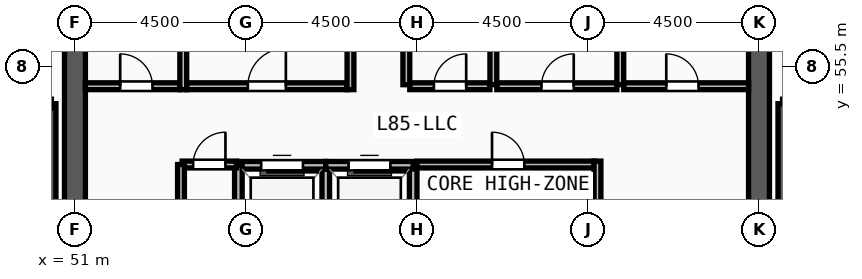
"""IFC4 building model, lengths in metres.
Left out: names, types, materials, properties, quantities, classifications, styles, units other than length and angle.
Written with IfcOpenShell. Run it as: python <this file> out.ifc"""

import sys

from ifc_helpers import new_model, si_unit, direction, frame, frame_2d, origin, place, context, subcontext, project, spatial, rectangle, extrude, source, transform, mapped, element, fill, save


model = new_model("IFC4")
c1 = context("Model", 3, precision=1e-05, world=origin(), true_north=direction((0.0, 1.0)))
c2 = subcontext(c1, "Body", "Model", "MODEL_VIEW")
j1 = project(units=[si_unit("LENGTHUNIT", "METRE"), si_unit("PLANEANGLEUNIT", "RADIAN")], contexts=[c1])
p1 = place(None, origin())
s1 = spatial("IfcSite", under=j1, at=p1, CompositionType="ELEMENT")
p2 = place(p1, origin())
s2 = spatial("IfcBuilding", under=s1, at=p2, CompositionType="ELEMENT")
p3 = place(p2, frame((0.0, 0.0, 328.5)))
s3 = spatial("IfcBuildingStorey", under=s2, at=p3, CompositionType="ELEMENT", Elevation=328.5)
p4 = place(p3, frame((69.0, 60.9, 0.0), z_axis=(0.0, 0.0, 1.0), x_axis=(0.0, -1.0, 0.0)))
e1 = element("IfcWall", 1, at=p4, inside=s3, PredefinedType="SHEAR", context=c2, shape_type="SweptSolid", body=[
    extrude(rectangle(XDim=13.8, YDim=0.55, at=frame_2d((6.9, 0.0))), origin(), (0.0, 0.0, 1.0), 3.57),
])
m1 = source(origin(), c2, "Body", "SweptSolid", [
    extrude(rectangle(XDim=1.2, YDim=2.2, at=frame_2d((0.6, 1.1))), frame((0.0, 0.285, 0.0), z_axis=(0.0, -1.0, 0.0), x_axis=(1.0, 0.0, 0.0)), (0.0, 0.0, 1.0), 0.57),
])
p5 = place(p4, frame((1.35, 0.0, 0.0)))
e2 = element("IfcOpeningElement", 2, at=p5, cuts=e1, PredefinedType="OPENING", context=c2, shape_type="MappedRepresentation", body=[
    mapped(m1, transform((0.0, 0.0, 0.0), x_axis=(1.0, 0.0, 0.0), y_axis=(0.0, 1.0, 0.0), z_axis=(0.0, 0.0, 1.0), scale=1.0)),
])
p6 = place(p3, frame((51.0, 47.1, 0.0), z_axis=(0.0, 0.0, 1.0), x_axis=(0.0, 1.0, 0.0)))
e3 = element("IfcWall", 3, at=p6, inside=s3, PredefinedType="SHEAR", context=c2, shape_type="SweptSolid", body=[
    extrude(rectangle(XDim=13.8, YDim=0.55, at=frame_2d((6.9, 0.0))), origin(), (0.0, 0.0, 1.0), 3.57),
])
for number, where, z_axis, x_axis in (
    (4, (50.38, 46.7, 0.0), (0.0, 0.0, 1.0), (0.0, 1.0, 0.0)),
    (5, (69.62, 54.52, 0.0), (0.0, 0.0, 1.0), (0.0, -1.0, 0.0)),
):
    element("IfcWall", number, at=place(p3, frame(where, z_axis=z_axis, x_axis=x_axis)), inside=s3, PredefinedType="SOLIDWALL", context=c2, shape_type="SweptSolid", body=[
        extrude(rectangle(XDim=7.82, YDim=0.24, at=frame_2d((3.91, 0.0))), origin(), (0.0, 0.0, 1.0), 3.57),
    ])
p7 = place(p3, frame((57.6, 50.3, 0.0), z_axis=(0.0, 0.0, 1.0), x_axis=(0.0, 1.0, 0.0)))
e6 = element("IfcWall", 6, at=p7, inside=s3, PredefinedType="SOLIDWALL", context=c2, shape_type="SweptSolid", body=[
    extrude(rectangle(XDim=2.6, YDim=0.2, at=frame_2d((1.3, 0.0))), origin(), (0.0, 0.0, 1.0), 3.57),
])
p8 = place(p3, frame((57.6, 52.9, 0.0), z_axis=(0.0, 0.0, 1.0), x_axis=(-1.0, 0.0, 0.0)))
e7 = element("IfcWall", 7, at=p8, inside=s3, PredefinedType="SOLIDWALL", context=c2, shape_type="SweptSolid", body=[
    extrude(rectangle(XDim=2.3, YDim=0.2, at=frame_2d((1.15, 0.0))), origin(), (0.0, 0.0, 1.0), 3.57),
])
m2 = source(origin(), c2, "Body", "SweptSolid", [
    extrude(rectangle(XDim=1.1, YDim=2.2, at=frame_2d((0.55, 1.1))), frame((0.0, 0.11, 0.0), z_axis=(0.0, -1.0, 0.0), x_axis=(1.0, 0.0, 0.0)), (0.0, 0.0, 1.0), 0.22),
])
p9 = place(p8, frame((0.6, 0.0, 0.0)))
e8 = element("IfcOpeningElement", 8, at=p9, cuts=e7, PredefinedType="OPENING", context=c2, shape_type="MappedRepresentation", body=[
    mapped(m2, transform((0.0, 0.0, 0.0), x_axis=(1.0, 0.0, 0.0), y_axis=(0.0, 1.0, 0.0), z_axis=(0.0, 0.0, 1.0), scale=1.0)),
])
for number, where, z_axis, x_axis in (
    (9, (55.3, 52.9, 0.0), (0.0, 0.0, 1.0), (0.0, -1.0, 0.0)),
    (10, (59.9, 50.3, 0.0), (0.0, 0.0, 1.0), (0.0, 1.0, 0.0)),
):
    element("IfcWall", number, at=place(p3, frame(where, z_axis=z_axis, x_axis=x_axis)), inside=s3, PredefinedType="SOLIDWALL", context=c2, shape_type="SweptSolid", body=[
        extrude(rectangle(XDim=2.6, YDim=0.2, at=frame_2d((1.3, 0.0))), origin(), (0.0, 0.0, 1.0), 3.57),
    ])
p10 = place(p3, frame((59.9, 52.9, 0.0), z_axis=(0.0, 0.0, 1.0), x_axis=(-1.0, 0.0, 0.0)))
e11 = element("IfcWall", 11, at=p10, inside=s3, PredefinedType="SOLIDWALL", context=c2, shape_type="SweptSolid", body=[
    extrude(rectangle(XDim=2.3, YDim=0.2, at=frame_2d((1.15, 0.0))), origin(), (0.0, 0.0, 1.0), 3.57),
])
p11 = place(p10, frame((0.6, 0.0, 0.0)))
e12 = element("IfcOpeningElement", 12, at=p11, cuts=e11, PredefinedType="OPENING", context=c2, shape_type="MappedRepresentation", body=[
    mapped(m2, transform((0.0, 0.0, 0.0), x_axis=(1.0, 0.0, 0.0), y_axis=(0.0, 1.0, 0.0), z_axis=(0.0, 0.0, 1.0), scale=1.0)),
])
p12 = place(p3, frame((60.0, 52.92, 0.0), z_axis=(0.0, 0.0, 1.0), x_axis=(1.0, 0.0, 0.0)))
e13 = element("IfcWall", 13, at=p12, inside=s3, PredefinedType="PARTITIONING", context=c2, shape_type="SweptSolid", body=[
    extrude(rectangle(XDim=4.66, YDim=0.18, at=frame_2d((2.33, 0.0))), origin(), (0.0, 0.0, 1.0), 3.57),
])
m3 = source(origin(), c2, "Body", "SweptSolid", [
    extrude(rectangle(XDim=0.85, YDim=2.1, at=frame_2d((0.425, 1.05))), frame((0.0, 0.1, 0.0), z_axis=(0.0, -1.0, 0.0), x_axis=(1.0, 0.0, 0.0)), (0.0, 0.0, 1.0), 0.2),
])
p13 = place(p12, frame((1.975, 0.0, 0.0)))
e14 = element("IfcOpeningElement", 14, at=p13, cuts=e13, PredefinedType="OPENING", context=c2, shape_type="MappedRepresentation", body=[
    mapped(m3, transform((0.0, 0.0, 0.0), x_axis=(1.0, 0.0, 0.0), y_axis=(0.0, 1.0, 0.0), z_axis=(0.0, 0.0, 1.0), scale=1.0)),
])
p14 = place(p3, frame((53.94, 54.98, 0.0), z_axis=(0.0, 0.0, 1.0), x_axis=(1.0, 0.0, 0.0)))
e15 = element("IfcWall", 15, at=p14, inside=s3, PredefinedType="PARTITIONING", context=c2, shape_type="SweptSolid", body=[
    extrude(rectangle(XDim=4.22, YDim=0.18, at=frame_2d((2.11, 0.0))), origin(), (0.0, 0.0, 1.0), 3.57),
])
m4 = source(origin(), c2, "Body", "SweptSolid", [
    extrude(rectangle(XDim=1.0, YDim=2.2, at=frame_2d((0.5, 1.1))), frame((0.0, 0.1, 0.0), z_axis=(0.0, -1.0, 0.0), x_axis=(1.0, 0.0, 0.0)), (0.0, 0.0, 1.0), 0.2),
])
p15 = place(p14, frame((1.61, 0.0, 0.0)))
e16 = element("IfcOpeningElement", 16, at=p15, cuts=e15, PredefinedType="OPENING", context=c2, shape_type="MappedRepresentation", body=[
    mapped(m4, transform((0.0, 0.0, 0.0), x_axis=(1.0, 0.0, 0.0), y_axis=(0.0, 1.0, 0.0), z_axis=(0.0, 0.0, 1.0), scale=1.0)),
])
p16 = place(p3, frame((51.275, 54.98, 0.0), z_axis=(0.0, 0.0, 1.0), x_axis=(1.0, 0.0, 0.0)))
e17 = element("IfcWall", 17, at=p16, inside=s3, PredefinedType="PARTITIONING", context=c2, shape_type="SweptSolid", body=[
    extrude(rectangle(XDim=2.485, YDim=0.18, at=frame_2d((1.243, 0.0))), origin(), (0.0, 0.0, 1.0), 3.57),
])
p17 = place(p16, frame((0.915, 0.0, 0.0)))
e18 = element("IfcOpeningElement", 18, at=p17, cuts=e17, PredefinedType="OPENING", context=c2, shape_type="MappedRepresentation", body=[
    mapped(m3, transform((0.0, 0.0, 0.0), x_axis=(1.0, 0.0, 0.0), y_axis=(0.0, 1.0, 0.0), z_axis=(0.0, 0.0, 1.0), scale=1.0)),
])
p18 = place(p3, frame((62.1, 54.98, 0.0), z_axis=(0.0, 0.0, 1.0), x_axis=(1.0, 0.0, 0.0)))
e19 = element("IfcWall", 19, at=p18, inside=s3, PredefinedType="PARTITIONING", context=c2, shape_type="SweptSolid", body=[
    extrude(rectangle(XDim=3.16, YDim=0.18, at=frame_2d((1.58, 0.0))), origin(), (0.0, 0.0, 1.0), 3.57),
])
p19 = place(p18, frame((1.175, 0.0, 0.0)))
e20 = element("IfcOpeningElement", 20, at=p19, cuts=e19, PredefinedType="OPENING", context=c2, shape_type="MappedRepresentation", body=[
    mapped(m3, transform((0.0, 0.0, 0.0), x_axis=(1.0, 0.0, 0.0), y_axis=(0.0, 1.0, 0.0), z_axis=(0.0, 0.0, 1.0), scale=1.0)),
])
p20 = place(p3, frame((65.44, 54.98, 0.0), z_axis=(0.0, 0.0, 1.0), x_axis=(1.0, 0.0, 0.0)))
e21 = element("IfcWall", 21, at=p20, inside=s3, PredefinedType="PARTITIONING", context=c2, shape_type="SweptSolid", body=[
    extrude(rectangle(XDim=3.285, YDim=0.18, at=frame_2d((1.643, 0.0))), origin(), (0.0, 0.0, 1.0), 3.57),
])
p21 = place(p20, frame((1.12, 0.0, 0.0)))
e22 = element("IfcOpeningElement", 22, at=p21, cuts=e21, PredefinedType="OPENING", context=c2, shape_type="MappedRepresentation", body=[
    mapped(m3, transform((0.0, 0.0, 0.0), x_axis=(1.0, 0.0, 0.0), y_axis=(0.0, 1.0, 0.0), z_axis=(0.0, 0.0, 1.0), scale=1.0)),
])
p22 = place(p3, frame((59.81, 54.98, 0.0), z_axis=(0.0, 0.0, 1.0), x_axis=(1.0, 0.0, 0.0)))
e23 = element("IfcWall", 23, at=p22, inside=s3, PredefinedType="PARTITIONING", context=c2, shape_type="SweptSolid", body=[
    extrude(rectangle(XDim=2.11, YDim=0.18, at=frame_2d((1.055, 0.0))), origin(), (0.0, 0.0, 1.0), 3.57),
])
p23 = place(p22, frame((0.635, 0.0, 0.0)))
e24 = element("IfcOpeningElement", 24, at=p23, cuts=e23, PredefinedType="OPENING", context=c2, shape_type="MappedRepresentation", body=[
    mapped(m3, transform((0.0, 0.0, 0.0), x_axis=(1.0, 0.0, 0.0), y_axis=(0.0, 1.0, 0.0), z_axis=(0.0, 0.0, 1.0), scale=1.0)),
])
p24 = place(p3, frame((53.82, 52.92, 0.0), z_axis=(0.0, 0.0, 1.0), x_axis=(1.0, 0.0, 0.0)))
e25 = element("IfcWall", 25, at=p24, inside=s3, PredefinedType="PARTITIONING", context=c2, shape_type="SweptSolid", body=[
    extrude(rectangle(XDim=1.43, YDim=0.18, at=frame_2d((0.715, 0.0))), origin(), (0.0, 0.0, 1.0), 3.57),
])
p25 = place(p24, frame((0.29, 0.0, 0.0)))
e26 = element("IfcOpeningElement", 26, at=p25, cuts=e25, PredefinedType="OPENING", context=c2, shape_type="MappedRepresentation", body=[
    mapped(m3, transform((0.0, 0.0, 0.0), x_axis=(1.0, 0.0, 0.0), y_axis=(0.0, 1.0, 0.0), z_axis=(0.0, 0.0, 1.0), scale=1.0)),
])
p26 = place(p3, frame((65.35, 55.02, 0.0), z_axis=(0.0, 0.0, 1.0), x_axis=(0.0, 1.0, 0.0)))
e27 = element("IfcWall", 27, at=p26, inside=s3, PredefinedType="PARTITIONING", context=c2, shape_type="SweptSolid", body=[
    extrude(rectangle(XDim=2.86, YDim=0.18, at=frame_2d((1.43, 0.0))), origin(), (0.0, 0.0, 1.0), 3.57),
])
for number, where, z_axis, x_axis in (
    (28, (59.72, 55.02, 0.0), (0.0, 0.0, 1.0), (0.0, 1.0, 0.0)),
    (29, (62.01, 55.02, 0.0), (0.0, 0.0, 1.0), (0.0, 1.0, 0.0)),
):
    element("IfcWall", number, at=place(p3, frame(where, z_axis=z_axis, x_axis=x_axis)), inside=s3, PredefinedType="PARTITIONING", context=c2, shape_type="SweptSolid", body=[
        extrude(rectangle(XDim=2.88, YDim=0.18, at=frame_2d((1.44, 0.0))), origin(), (0.0, 0.0, 1.0), 3.57),
    ])
p27 = place(p3, frame((53.79, 50.35, 0.0), z_axis=(0.0, 0.0, 1.0), x_axis=(0.0, 1.0, 0.0)))
e30 = element("IfcWall", 30, at=p27, inside=s3, PredefinedType="PARTITIONING", context=c2, shape_type="SweptSolid", body=[
    extrude(rectangle(XDim=2.57, YDim=0.18, at=frame_2d((1.285, 0.0))), origin(), (0.0, 0.0, 1.0), 3.57),
])
p28 = place(p3, frame((64.75, 50.36, 0.0), z_axis=(0.0, 0.0, 1.0), x_axis=(0.0, 1.0, 0.0)))
e31 = element("IfcWall", 31, at=p28, inside=s3, PredefinedType="PARTITIONING", context=c2, shape_type="SweptSolid", body=[
    extrude(rectangle(XDim=2.65, YDim=0.18, at=frame_2d((1.325, 0.0))), origin(), (0.0, 0.0, 1.0), 3.57),
])
for number, where, z_axis, x_axis in (
    (32, (53.85, 54.89, 0.0), (0.0, 0.0, 1.0), (0.0, 1.0, 0.0)),
    (33, (58.25, 54.89, 0.0), (0.0, 0.0, 1.0), (0.0, 1.0, 0.0)),
):
    element("IfcWall", number, at=place(p3, frame(where, z_axis=z_axis, x_axis=x_axis)), inside=s3, PredefinedType="PARTITIONING", context=c2, shape_type="SweptSolid", body=[
        extrude(rectangle(XDim=3.02, YDim=0.18, at=frame_2d((1.51, 0.0))), origin(), (0.0, 0.0, 1.0), 3.57),
    ])
m5 = source(origin(), c2, "Body", "SweptSolid", [
    extrude(rectangle(XDim=1.1, YDim=2.2, at=frame_2d((0.55, 1.1))), frame((0.0, 0.025, 0.0), z_axis=(0.0, -1.0, 0.0), x_axis=(1.0, 0.0, 0.0)), (0.0, 0.0, 1.0), 0.05),
])
p29 = place(p9, origin())
e34 = element("IfcDoor", 34, at=p29, inside=s3, OperationType="SLIDING_TO_LEFT", PredefinedType="DOOR", context=c2, shape_type="MappedRepresentation", body=[
    mapped(m5, transform((0.0, 0.0, 0.0), x_axis=(1.0, 0.0, 0.0), y_axis=(0.0, 1.0, 0.0), z_axis=(0.0, 0.0, 1.0), scale=1.0)),
])
fill(e8, e34)
p30 = place(p11, origin())
e35 = element("IfcDoor", 35, at=p30, inside=s3, OperationType="SLIDING_TO_LEFT", PredefinedType="DOOR", context=c2, shape_type="MappedRepresentation", body=[
    mapped(m5, transform((0.0, 0.0, 0.0), x_axis=(1.0, 0.0, 0.0), y_axis=(0.0, 1.0, 0.0), z_axis=(0.0, 0.0, 1.0), scale=1.0)),
])
fill(e12, e35)
m6 = source(origin(), c2, "Body", "SweptSolid", [
    extrude(rectangle(XDim=0.85, YDim=2.1, at=frame_2d((0.425, 1.05))), frame((0.0, 0.025, 0.0), z_axis=(0.0, -1.0, 0.0), x_axis=(1.0, 0.0, 0.0)), (0.0, 0.0, 1.0), 0.05),
])
p31 = place(p13, origin())
e36 = element("IfcDoor", 36, at=p31, inside=s3, OperationType="SINGLE_SWING_LEFT", PredefinedType="DOOR", context=c2, shape_type="MappedRepresentation", body=[
    mapped(m6, transform((0.0, 0.0, 0.0), x_axis=(1.0, 0.0, 0.0), y_axis=(0.0, 1.0, 0.0), z_axis=(0.0, 0.0, 1.0), scale=1.0)),
])
fill(e14, e36)
m7 = source(origin(), c2, "Body", "SweptSolid", [
    extrude(rectangle(XDim=1.0, YDim=2.2, at=frame_2d((0.5, 1.1))), frame((0.0, 0.025, 0.0), z_axis=(0.0, -1.0, 0.0), x_axis=(1.0, 0.0, 0.0)), (0.0, 0.0, 1.0), 0.05),
])
p32 = place(p15, origin())
e37 = element("IfcDoor", 37, at=p32, inside=s3, OperationType="SINGLE_SWING_RIGHT", PredefinedType="DOOR", context=c2, shape_type="MappedRepresentation", body=[
    mapped(m7, transform((0.0, 0.0, 0.0), x_axis=(1.0, 0.0, 0.0), y_axis=(0.0, 1.0, 0.0), z_axis=(0.0, 0.0, 1.0), scale=1.0)),
])
fill(e16, e37)
p33 = place(p17, origin())
e38 = element("IfcDoor", 38, at=p33, inside=s3, OperationType="SINGLE_SWING_LEFT", PredefinedType="DOOR", context=c2, shape_type="MappedRepresentation", body=[
    mapped(m6, transform((0.0, 0.0, 0.0), x_axis=(1.0, 0.0, 0.0), y_axis=(0.0, 1.0, 0.0), z_axis=(0.0, 0.0, 1.0), scale=1.0)),
])
fill(e18, e38)
p34 = place(p19, origin())
e39 = element("IfcDoor", 39, at=p34, inside=s3, OperationType="SINGLE_SWING_RIGHT", PredefinedType="DOOR", context=c2, shape_type="MappedRepresentation", body=[
    mapped(m6, transform((0.0, 0.0, 0.0), x_axis=(1.0, 0.0, 0.0), y_axis=(0.0, 1.0, 0.0), z_axis=(0.0, 0.0, 1.0), scale=1.0)),
])
fill(e20, e39)
p35 = place(p21, origin())
e40 = element("IfcDoor", 40, at=p35, inside=s3, OperationType="SINGLE_SWING_LEFT", PredefinedType="DOOR", context=c2, shape_type="MappedRepresentation", body=[
    mapped(m6, transform((0.0, 0.0, 0.0), x_axis=(1.0, 0.0, 0.0), y_axis=(0.0, 1.0, 0.0), z_axis=(0.0, 0.0, 1.0), scale=1.0)),
])
fill(e22, e40)
p36 = place(p23, origin())
e41 = element("IfcDoor", 41, at=p36, inside=s3, OperationType="SINGLE_SWING_RIGHT", PredefinedType="DOOR", context=c2, shape_type="MappedRepresentation", body=[
    mapped(m6, transform((0.0, 0.0, 0.0), x_axis=(1.0, 0.0, 0.0), y_axis=(0.0, 1.0, 0.0), z_axis=(0.0, 0.0, 1.0), scale=1.0)),
])
fill(e24, e41)
p37 = place(p25, origin())
e42 = element("IfcDoor", 42, at=p37, inside=s3, OperationType="SINGLE_SWING_RIGHT", PredefinedType="DOOR", context=c2, shape_type="MappedRepresentation", body=[
    mapped(m6, transform((0.0, 0.0, 0.0), x_axis=(1.0, 0.0, 0.0), y_axis=(0.0, 1.0, 0.0), z_axis=(0.0, 0.0, 1.0), scale=1.0)),
])
fill(e26, e42)
save(model, sys.argv[1])
